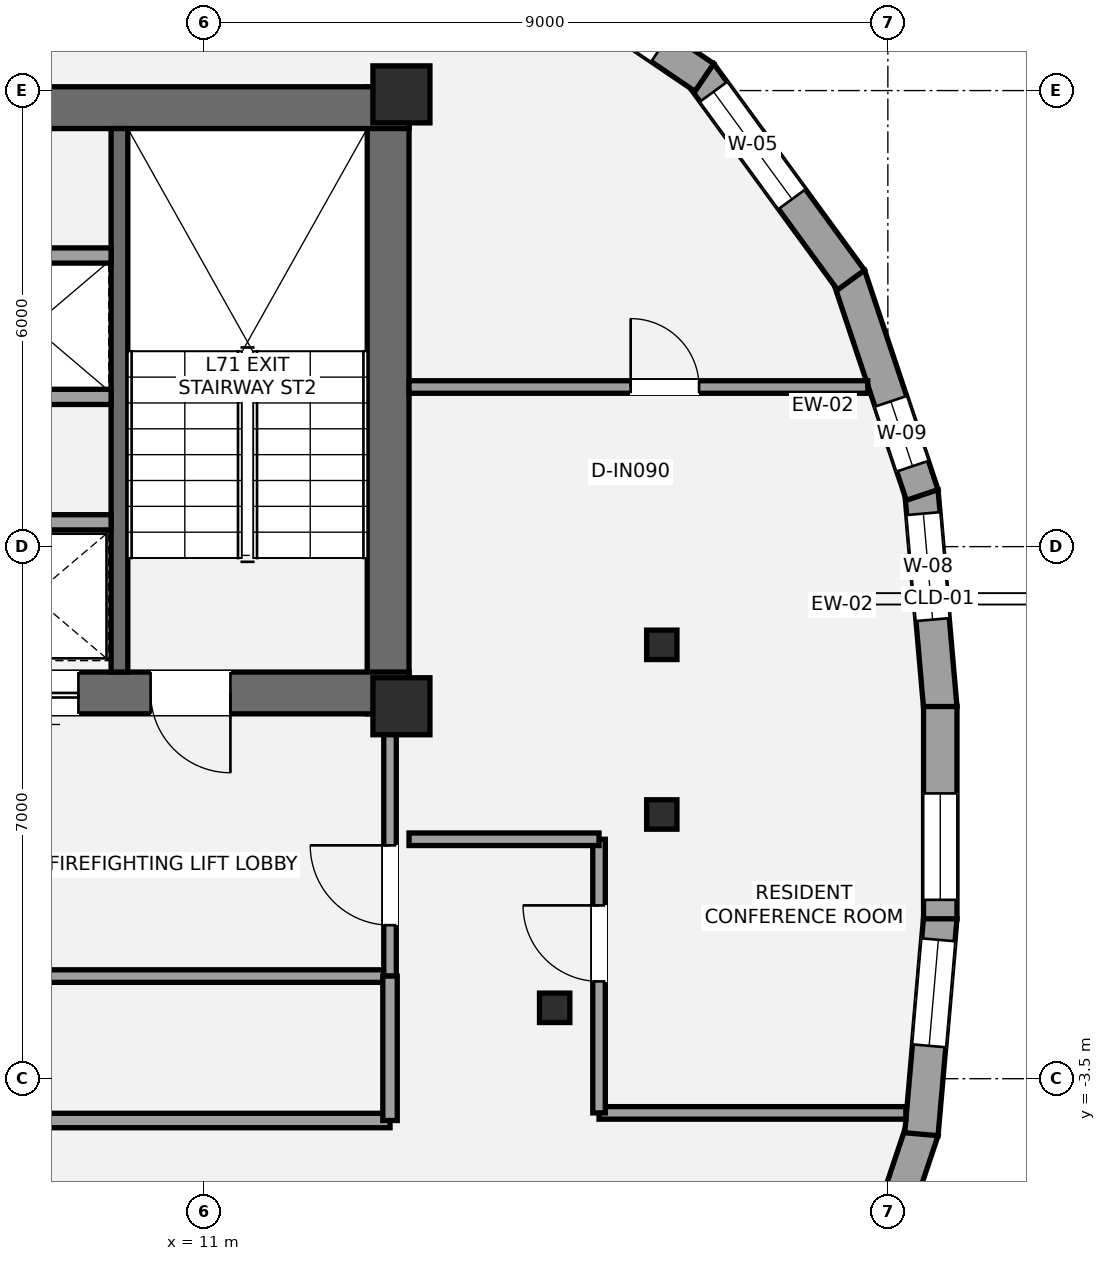
"""IFC4 building model, lengths in metres.
Left out: names, types, materials, properties, quantities, classifications, styles, units other than length and angle.
Written with IfcOpenShell. Run it as: python <this file> out.ifc"""

import sys

from ifc_helpers import new_model, si_unit, direction, frame, frame_2d, origin, origin_2d, place, context, subcontext, project, spatial, rectangle, i_section, extrude, element, fill, save


model = new_model("IFC4")
c1 = context("Model", 3, precision=1e-05, world=origin(), true_north=direction((0.0, 1.0)))
c2 = subcontext(c1, "Body", "Model", "MODEL_VIEW")
j1 = project(units=[si_unit("LENGTHUNIT", "METRE"), si_unit("PLANEANGLEUNIT", "RADIAN")], contexts=[c1])
p1 = place(None, origin())
s1 = spatial("IfcSite", under=j1, at=p1, CompositionType="ELEMENT")
p2 = place(p1, origin())
s2 = spatial("IfcBuilding", under=s1, at=p2, CompositionType="ELEMENT")
p3 = place(p2, frame((0.0, 0.0, 250.95)))
s3 = spatial("IfcBuildingStorey", under=s2, at=p3, CompositionType="ELEMENT", Elevation=250.95)
p4 = place(p3, frame((13.425, 1.3, 0.0), z_axis=(0.0, 0.0, 1.0), x_axis=(0.0, 1.0, 0.0)))
e1 = element("IfcWall", 1, at=p4, inside=s3, PredefinedType="SHEAR", context=c2, shape_type="SweptSolid", body=[
    extrude(rectangle(XDim=8.25, YDim=0.55, at=frame_2d((4.125, 0.0))), origin(), (0.0, 0.0, 1.0), 3.15),
])
p5 = place(p3, frame((4.525, 9.275, 0.0), z_axis=(0.0, 0.0, 1.0), x_axis=(1.0, 0.0, 0.0)))
e2 = element("IfcWall", 2, at=p5, inside=s3, PredefinedType="SHEAR", context=c2, shape_type="SweptSolid", body=[
    extrude(rectangle(XDim=9.175, YDim=0.55, at=frame_2d((4.587, 0.0))), origin(), (0.0, 0.0, 1.0), 3.15),
])
p6 = place(p3, frame((13.7, 1.575, 0.0), z_axis=(0.0, 0.0, 1.0), x_axis=(-1.0, 0.0, 0.0)))
e3 = element("IfcWall", 3, at=p6, inside=s3, PredefinedType="SHEAR", context=c2, shape_type="SweptSolid", body=[
    extrude(rectangle(XDim=8.775, YDim=0.55, at=frame_2d((4.387, 0.0))), origin(), (0.0, 0.0, 1.0), 3.15),
])
p7 = place(p6, frame((2.35, 0.0, 0.0)))
e4 = element("IfcOpeningElement", 4, at=p7, cuts=e3, PredefinedType="OPENING", context=c2, shape_type="SweptSolid", body=[
    extrude(rectangle(XDim=1.05, YDim=2.15, at=frame_2d((0.525, 1.075))), frame((0.0, 0.285, 0.0), z_axis=(0.0, -1.0, 0.0), x_axis=(1.0, 0.0, 0.0)), (0.0, 0.0, 1.0), 0.57),
])
p8 = place(p6, frame((4.35, 0.0, 0.0)))
e5 = element("IfcOpeningElement", 5, at=p8, cuts=e3, PredefinedType="OPENING", context=c2, shape_type="SweptSolid", body=[
    extrude(rectangle(XDim=1.1, YDim=2.2, at=frame_2d((0.55, 1.1))), frame((0.0, 0.285, 0.0), z_axis=(0.0, -1.0, 0.0), x_axis=(1.0, 0.0, 0.0)), (0.0, 0.0, 1.0), 0.57),
])
p9 = place(p3, frame((9.89, 1.85, 0.0), z_axis=(0.0, 0.0, 1.0), x_axis=(0.0, 1.0, 0.0)))
e6 = element("IfcWall", 6, at=p9, inside=s3, PredefinedType="SHEAR", context=c2, shape_type="SweptSolid", body=[
    extrude(rectangle(XDim=7.15, YDim=0.22, at=frame_2d((3.575, 0.0))), origin(), (0.0, 0.0, 1.0), 3.15),
])
for number, where, z_axis, x_axis in (
    (7, (13.6, 1.4, 0.0), (0.0, 0.0, 1.0), (1.0, 0.0, 0.0)),
    (8, (13.6, 9.45, 0.0), (0.0, 0.0, 1.0), (1.0, 0.0, 0.0)),
):
    element("IfcColumn", number, at=place(p3, frame(where, z_axis=z_axis, x_axis=x_axis)), inside=s3, PredefinedType="PILASTER", context=c2, shape_type="SweptSolid", body=[
        extrude(rectangle(XDim=0.75, YDim=0.75, at=origin_2d()), origin(), (0.0, 0.0, 1.0), 3.15),
    ])
for number, where, z_axis, x_axis in (
    (9, (17.026, 2.208, 0.0), (0.0, 0.0, 1.0), (1.0, 0.0, 0.0)),
    (10, (15.616, -2.567, 0.0), (0.0, 0.0, 1.0), (1.0, 0.0, 0.0)),
    (11, (17.026, -0.024, 0.0), (0.0, 0.0, 1.0), (1.0, 0.0, 0.0)),
):
    element("IfcColumn", number, at=place(p3, frame(where, z_axis=z_axis, x_axis=x_axis)), inside=s3, PredefinedType="COLUMN", context=c2, shape_type="SweptSolid", body=[
        extrude(i_section(OverallWidth=0.399, OverallDepth=0.387, WebThickness=0.021, FlangeThickness=0.033, at=origin_2d()), origin(), (0.0, 0.0, 1.0), 3.15),
    ])
p10 = place(p3, frame((20.441, 4.23, 0.0), z_axis=(0.0, 0.0, 1.0), x_axis=(0.086868726907, -0.996219767062, 0.0)))
e12 = element("IfcWall", 12, at=p10, inside=s3, PredefinedType="STANDARD", context=c2, shape_type="SweptSolid", body=[
    extrude(rectangle(XDim=2.864, YDim=0.44, at=frame_2d((1.432, 0.0))), origin(), (0.0, 0.0, 1.0), 2.336),
])
p11 = place(p10, frame((0.297, 0.0, 0.55)))
e13 = element("IfcOpeningElement", 13, at=p11, cuts=e12, PredefinedType="OPENING", context=c2, shape_type="SweptSolid", body=[
    extrude(rectangle(XDim=1.4, YDim=1.55, at=frame_2d((0.7, 0.775))), frame((0.0, 0.23, 0.0), z_axis=(0.0, -1.0, 0.0), x_axis=(1.0, 0.0, 0.0)), (0.0, 0.0, 1.0), 0.46),
])
p12 = place(p3, frame((19.485, 7.067, 0.0), z_axis=(0.0, 0.0, 1.0), x_axis=(0.317622332961, -0.948217302945, 0.0)))
e14 = element("IfcWall", 14, at=p12, inside=s3, PredefinedType="STANDARD", context=c2, shape_type="SweptSolid", body=[
    extrude(rectangle(XDim=3.045, YDim=0.44, at=frame_2d((1.523, 0.0))), origin(), (0.0, 0.0, 1.0), 2.336),
])
p13 = place(p12, frame((1.746, 0.0, 0.58)))
e15 = element("IfcOpeningElement", 15, at=p13, cuts=e14, PredefinedType="OPENING", context=c2, shape_type="SweptSolid", body=[
    extrude(rectangle(XDim=0.9, YDim=1.35, at=frame_2d((0.45, 0.675))), frame((0.0, 0.23, 0.0), z_axis=(0.0, -1.0, 0.0), x_axis=(1.0, 0.0, 0.0)), (0.0, 0.0, 1.0), 0.46),
])
p14 = place(p3, frame((17.531, 9.724, 0.0), z_axis=(0.0, 0.0, 1.0), x_axis=(0.589698134284, -0.807623743102, 0.0)))
e16 = element("IfcWall", 16, at=p14, inside=s3, PredefinedType="STANDARD", context=c2, shape_type="SweptSolid", body=[
    extrude(rectangle(XDim=3.364, YDim=0.44, at=frame_2d((1.682, 0.0))), origin(), (0.0, 0.0, 1.0), 2.336),
])
p15 = place(p14, frame((0.297, 0.0, 0.55)))
e17 = element("IfcOpeningElement", 17, at=p15, cuts=e16, PredefinedType="OPENING", context=c2, shape_type="SweptSolid", body=[
    extrude(rectangle(XDim=1.75, YDim=1.55, at=frame_2d((0.875, 0.775))), frame((0.0, 0.23, 0.0), z_axis=(0.0, -1.0, 0.0), x_axis=(1.0, 0.0, 0.0)), (0.0, 0.0, 1.0), 0.46),
])
p16 = place(p3, frame((14.41, 11.825, 0.0), z_axis=(0.0, 0.0, 1.0), x_axis=(0.827707997274, -0.56115904274, 0.0)))
e18 = element("IfcWall", 18, at=p16, inside=s3, PredefinedType="STANDARD", context=c2, shape_type="SweptSolid", body=[
    extrude(rectangle(XDim=3.837, YDim=0.44, at=frame_2d((1.918, 0.0))), origin(), (0.0, 0.0, 1.0), 2.336),
])
p17 = place(p16, frame((1.391, 0.0, 0.55)))
e19 = element("IfcOpeningElement", 19, at=p17, cuts=e18, PredefinedType="OPENING", context=c2, shape_type="SweptSolid", body=[
    extrude(rectangle(XDim=1.75, YDim=1.55, at=frame_2d((0.875, 0.775))), frame((0.0, 0.23, 0.0), z_axis=(0.0, -1.0, 0.0), x_axis=(1.0, 0.0, 0.0)), (0.0, 0.0, 1.0), 0.46),
])
p18 = place(p3, frame((20.452, -4.179, 0.0), z_axis=(0.0, 0.0, 1.0), x_axis=(-0.317622332961, -0.948217302945, 0.0)))
e20 = element("IfcWall", 20, at=p18, inside=s3, PredefinedType="STANDARD", context=c2, shape_type="SweptSolid", body=[
    extrude(rectangle(XDim=3.045, YDim=0.44, at=frame_2d((1.523, 0.0))), origin(), (0.0, 0.0, 1.0), 2.336),
])
p19 = place(p3, frame((20.69, -1.377, 0.0), z_axis=(0.0, 0.0, 1.0), x_axis=(-0.086868726907, -0.996219767062, 0.0)))
e21 = element("IfcWall", 21, at=p19, inside=s3, PredefinedType="STANDARD", context=c2, shape_type="SweptSolid", body=[
    extrude(rectangle(XDim=2.864, YDim=0.44, at=frame_2d((1.432, 0.0))), origin(), (0.0, 0.0, 1.0), 2.336),
])
p20 = place(p19, frame((0.297, 0.0, 0.55)))
e22 = element("IfcOpeningElement", 22, at=p20, cuts=e21, PredefinedType="OPENING", context=c2, shape_type="SweptSolid", body=[
    extrude(rectangle(XDim=1.4, YDim=1.55, at=frame_2d((0.7, 0.775))), frame((0.0, 0.23, 0.0), z_axis=(0.0, -1.0, 0.0), x_axis=(1.0, 0.0, 0.0)), (0.0, 0.0, 1.0), 0.46),
])
p21 = place(p3, frame((20.689, 1.396, 0.0), z_axis=(0.0, 0.0, 1.0), x_axis=(0.0, -1.0, 0.0)))
e23 = element("IfcWall", 23, at=p21, inside=s3, PredefinedType="STANDARD", context=c2, shape_type="SweptSolid", body=[
    extrude(rectangle(XDim=2.792, YDim=0.44, at=frame_2d((1.396, 0.0))), origin(), (0.0, 0.0, 1.0), 2.336),
])
p22 = place(p21, frame((1.143, 0.0, 0.58)))
e24 = element("IfcOpeningElement", 24, at=p22, cuts=e23, PredefinedType="OPENING", context=c2, shape_type="SweptSolid", body=[
    extrude(rectangle(XDim=1.4, YDim=1.55, at=frame_2d((0.7, 0.775))), frame((0.0, 0.23, 0.0), z_axis=(0.0, -1.0, 0.0), x_axis=(1.0, 0.0, 0.0)), (0.0, 0.0, 1.0), 0.46),
])
p23 = place(p3, frame((7.2, -2.15, 0.0), z_axis=(0.0, 0.0, 1.0), x_axis=(1.0, 0.0, 0.0)))
e25 = element("IfcWall", 25, at=p23, inside=s3, PredefinedType="PARTITIONING", context=c2, shape_type="SweptSolid", body=[
    extrude(rectangle(XDim=6.25, YDim=0.165, at=frame_2d((3.125, 0.0))), origin(), (0.0, 0.0, 1.0), 2.97),
])
p24 = place(p3, frame((13.45, -2.15, 0.0), z_axis=(0.0, 0.0, 1.0), x_axis=(0.0, 1.0, 0.0)))
e26 = element("IfcWall", 26, at=p24, inside=s3, PredefinedType="PARTITIONING", context=c2, shape_type="SweptSolid", body=[
    extrude(rectangle(XDim=3.5, YDim=0.165, at=frame_2d((1.75, 0.0))), origin(), (0.0, 0.0, 1.0), 2.97),
])
p25 = place(p24, frame((0.67, 0.0, 0.0)))
e27 = element("IfcOpeningElement", 27, at=p25, cuts=e26, PredefinedType="OPENING", context=c2, shape_type="SweptSolid", body=[
    extrude(rectangle(XDim=1.05, YDim=2.15, at=frame_2d((0.525, 1.075))), frame((0.0, 0.093, 0.0), z_axis=(0.0, -1.0, 0.0), x_axis=(1.0, 0.0, 0.0)), (0.0, 0.0, 1.0), 0.185),
])
p26 = place(p3, frame((5.475, 3.82, 0.0), z_axis=(0.0, 0.0, 1.0), x_axis=(1.0, 0.0, 0.0)))
e28 = element("IfcWall", 28, at=p26, inside=s3, PredefinedType="SOLIDWALL", context=c2, shape_type="SweptSolid", body=[
    extrude(rectangle(XDim=4.305, YDim=0.2, at=frame_2d((2.152, 0.0))), origin(), (0.0, 0.0, 1.0), 2.97),
])
p27 = place(p26, frame((0.65, 0.0, 0.0)))
e29 = element("IfcOpeningElement", 29, at=p27, cuts=e28, PredefinedType="OPENING", context=c2, shape_type="SweptSolid", body=[
    extrude(rectangle(XDim=1.2, YDim=2.2, at=frame_2d((0.6, 1.1))), frame((0.0, 0.11, 0.0), z_axis=(0.0, -1.0, 0.0), x_axis=(1.0, 0.0, 0.0)), (0.0, 0.0, 1.0), 0.22),
])
for number, where, z_axis, x_axis in (
    (30, (5.475, 5.47, 0.0), (0.0, 0.0, 1.0), (1.0, 0.0, 0.0)),
    (31, (5.475, 7.33, 0.0), (0.0, 0.0, 1.0), (1.0, 0.0, 0.0)),
):
    element("IfcWall", number, at=place(p3, frame(where, z_axis=z_axis, x_axis=x_axis)), inside=s3, PredefinedType="SOLIDWALL", context=c2, shape_type="SweptSolid", body=[
        extrude(rectangle(XDim=4.305, YDim=0.2, at=frame_2d((2.152, 0.0))), origin(), (0.0, 0.0, 1.0), 2.97),
    ])
p28 = place(p3, frame((2.1, -4.05, 0.0), z_axis=(0.0, 0.0, 1.0), x_axis=(1.0, 0.0, 0.0)))
e32 = element("IfcWall", 32, at=p28, inside=s3, PredefinedType="PLUMBINGWALL", context=c2, shape_type="SweptSolid", body=[
    extrude(rectangle(XDim=11.35, YDim=0.19, at=frame_2d((5.675, 0.0))), origin(), (0.0, 0.0, 1.0), 2.357),
])
p29 = place(p28, frame((5.2, 0.0, 0.0)))
e33 = element("IfcOpeningElement", 33, at=p29, cuts=e32, PredefinedType="OPENING", context=c2, shape_type="SweptSolid", body=[
    extrude(rectangle(XDim=0.9, YDim=2.1, at=frame_2d((0.45, 1.05))), frame((0.0, 0.105, 0.0), z_axis=(0.0, -1.0, 0.0), x_axis=(1.0, 0.0, 0.0)), (0.0, 0.0, 1.0), 0.21),
])
p30 = place(p3, frame((13.45, -4.05, 0.0), z_axis=(0.0, 0.0, 1.0), x_axis=(0.0, 1.0, 0.0)))
e34 = element("IfcWall", 34, at=p30, inside=s3, PredefinedType="PLUMBINGWALL", context=c2, shape_type="SweptSolid", body=[
    extrude(rectangle(XDim=1.9, YDim=0.19, at=frame_2d((0.95, 0.0))), origin(), (0.0, 0.0, 1.0), 2.423),
])
p31 = place(p3, frame((16.2, -3.95, 0.0), z_axis=(0.0, 0.0, 1.0), x_axis=(1.0, 0.0, 0.0)))
e35 = element("IfcWall", 35, at=p31, inside=s3, PredefinedType="PARTITIONING", context=c2, shape_type="SweptSolid", body=[
    extrude(rectangle(XDim=4.037, YDim=0.165, at=frame_2d((2.019, 0.0))), origin(), (0.0, 0.0, 1.0), 2.423),
])
p32 = place(p3, frame((16.2, -3.95, 0.0), z_axis=(0.0, 0.0, 1.0), x_axis=(0.0, 1.0, 0.0)))
e36 = element("IfcWall", 36, at=p32, inside=s3, PredefinedType="PARTITIONING", context=c2, shape_type="SweptSolid", body=[
    extrude(rectangle(XDim=3.6, YDim=0.165, at=frame_2d((1.8, 0.0))), origin(), (0.0, 0.0, 1.0), 2.357),
])
p33 = place(p32, frame((1.73, 0.0, 0.0)))
e37 = element("IfcOpeningElement", 37, at=p33, cuts=e36, PredefinedType="OPENING", context=c2, shape_type="SweptSolid", body=[
    extrude(rectangle(XDim=1.0, YDim=2.15, at=frame_2d((0.5, 1.075))), frame((0.0, 0.093, 0.0), z_axis=(0.0, -1.0, 0.0), x_axis=(1.0, 0.0, 0.0)), (0.0, 0.0, 1.0), 0.185),
])
p34 = place(p3, frame((13.7, -0.35, 0.0), z_axis=(0.0, 0.0, 1.0), x_axis=(1.0, 0.0, 0.0)))
e38 = element("IfcWall", 38, at=p34, inside=s3, PredefinedType="PARTITIONING", context=c2, shape_type="SweptSolid", body=[
    extrude(rectangle(XDim=2.5, YDim=0.165, at=frame_2d((1.25, 0.0))), origin(), (0.0, 0.0, 1.0), 2.423),
])
p35 = place(p3, frame((13.7, 5.6, 0.0), z_axis=(0.0, 0.0, 1.0), x_axis=(1.0, 0.0, 0.0)))
e39 = element("IfcWall", 39, at=p35, inside=s3, PredefinedType="PARTITIONING", context=c2, shape_type="SweptSolid", body=[
    extrude(rectangle(XDim=6.036, YDim=0.165, at=frame_2d((3.018, 0.0))), origin(), (0.0, 0.0, 1.0), 2.423),
])
p36 = place(p35, frame((2.916, 0.0, 0.0)))
e40 = element("IfcOpeningElement", 40, at=p36, cuts=e39, PredefinedType="OPENING", context=c2, shape_type="SweptSolid", body=[
    extrude(rectangle(XDim=0.9, YDim=2.1, at=frame_2d((0.45, 1.05))), frame((0.0, 0.093, 0.0), z_axis=(0.0, -1.0, 0.0), x_axis=(1.0, 0.0, 0.0)), (0.0, 0.0, 1.0), 0.185),
])
p37 = place(p11, origin())
e41 = element("IfcWindow", 41, at=p37, inside=s3, PartitioningType="SINGLE_PANEL", PredefinedType="WINDOW", context=c2, shape_type="SweptSolid", body=[
    extrude(rectangle(XDim=1.4, YDim=1.55, at=frame_2d((0.7, 0.775))), frame((0.0, -0.01, 0.0), z_axis=(0.0, -1.0, 0.0), x_axis=(1.0, 0.0, 0.0)), (0.0, 0.0, 1.0), 0.06),
])
fill(e13, e41)
p38 = place(p13, origin())
e42 = element("IfcWindow", 42, at=p38, inside=s3, PartitioningType="SINGLE_PANEL", PredefinedType="WINDOW", context=c2, shape_type="SweptSolid", body=[
    extrude(rectangle(XDim=0.9, YDim=1.35, at=frame_2d((0.45, 0.675))), frame((0.0, -0.01, 0.0), z_axis=(0.0, -1.0, 0.0), x_axis=(1.0, 0.0, 0.0)), (0.0, 0.0, 1.0), 0.06),
])
fill(e15, e42)
p39 = place(p15, origin())
e43 = element("IfcWindow", 43, at=p39, inside=s3, PartitioningType="SINGLE_PANEL", PredefinedType="WINDOW", context=c2, shape_type="SweptSolid", body=[
    extrude(rectangle(XDim=1.75, YDim=1.55, at=frame_2d((0.875, 0.775))), frame((0.0, -0.01, 0.0), z_axis=(0.0, -1.0, 0.0), x_axis=(1.0, 0.0, 0.0)), (0.0, 0.0, 1.0), 0.06),
])
fill(e17, e43)
p40 = place(p20, origin())
e44 = element("IfcWindow", 44, at=p40, inside=s3, PartitioningType="SINGLE_PANEL", PredefinedType="WINDOW", context=c2, shape_type="SweptSolid", body=[
    extrude(rectangle(XDim=1.4, YDim=1.55, at=frame_2d((0.7, 0.775))), frame((0.0, -0.01, 0.0), z_axis=(0.0, -1.0, 0.0), x_axis=(1.0, 0.0, 0.0)), (0.0, 0.0, 1.0), 0.06),
])
fill(e22, e44)
p41 = place(p22, origin())
e45 = element("IfcWindow", 45, at=p41, inside=s3, PartitioningType="SINGLE_PANEL", PredefinedType="WINDOW", context=c2, shape_type="SweptSolid", body=[
    extrude(rectangle(XDim=1.4, YDim=1.55, at=frame_2d((0.7, 0.775))), frame((0.0, -0.01, 0.0), z_axis=(0.0, -1.0, 0.0), x_axis=(1.0, 0.0, 0.0)), (0.0, 0.0, 1.0), 0.06),
])
fill(e24, e45)
p42 = place(p7, origin())
e46 = element("IfcDoor", 46, at=p42, inside=s3, OperationType="SINGLE_SWING_LEFT", PredefinedType="DOOR", context=c2, shape_type="SweptSolid", body=[
    extrude(rectangle(XDim=1.05, YDim=2.15, at=frame_2d((0.525, 1.075))), frame((0.0, 0.025, 0.0), z_axis=(0.0, -1.0, 0.0), x_axis=(1.0, 0.0, 0.0)), (0.0, 0.0, 1.0), 0.05),
])
fill(e4, e46)
p43 = place(p25, origin())
e47 = element("IfcDoor", 47, at=p43, inside=s3, OperationType="SINGLE_SWING_RIGHT", PredefinedType="DOOR", context=c2, shape_type="SweptSolid", body=[
    extrude(rectangle(XDim=1.05, YDim=2.15, at=frame_2d((0.525, 1.075))), frame((0.0, 0.025, 0.0), z_axis=(0.0, -1.0, 0.0), x_axis=(1.0, 0.0, 0.0)), (0.0, 0.0, 1.0), 0.05),
])
fill(e27, e47)
p44 = place(p8, origin())
e48 = element("IfcDoor", 48, at=p44, inside=s3, OperationType="SLIDING_TO_LEFT", PredefinedType="DOOR", context=c2, shape_type="SweptSolid", body=[
    extrude(rectangle(XDim=1.1, YDim=2.2, at=frame_2d((0.55, 1.1))), frame((0.0, 0.025, 0.0), z_axis=(0.0, -1.0, 0.0), x_axis=(1.0, 0.0, 0.0)), (0.0, 0.0, 1.0), 0.05),
])
fill(e5, e48)
p45 = place(p33, origin())
e49 = element("IfcDoor", 49, at=p45, inside=s3, OperationType="SINGLE_SWING_RIGHT", PredefinedType="DOOR", context=c2, shape_type="SweptSolid", body=[
    extrude(rectangle(XDim=1.0, YDim=2.15, at=frame_2d((0.5, 1.075))), frame((0.0, 0.025, 0.0), z_axis=(0.0, -1.0, 0.0), x_axis=(1.0, 0.0, 0.0)), (0.0, 0.0, 1.0), 0.05),
])
fill(e37, e49)
p46 = place(p36, origin())
e50 = element("IfcDoor", 50, at=p46, inside=s3, OperationType="SINGLE_SWING_LEFT", PredefinedType="DOOR", context=c2, shape_type="SweptSolid", body=[
    extrude(rectangle(XDim=0.9, YDim=2.1, at=frame_2d((0.45, 1.05))), frame((0.0, 0.025, 0.0), z_axis=(0.0, -1.0, 0.0), x_axis=(1.0, 0.0, 0.0)), (0.0, 0.0, 1.0), 0.05),
])
fill(e40, e50)
save(model, sys.argv[1])
